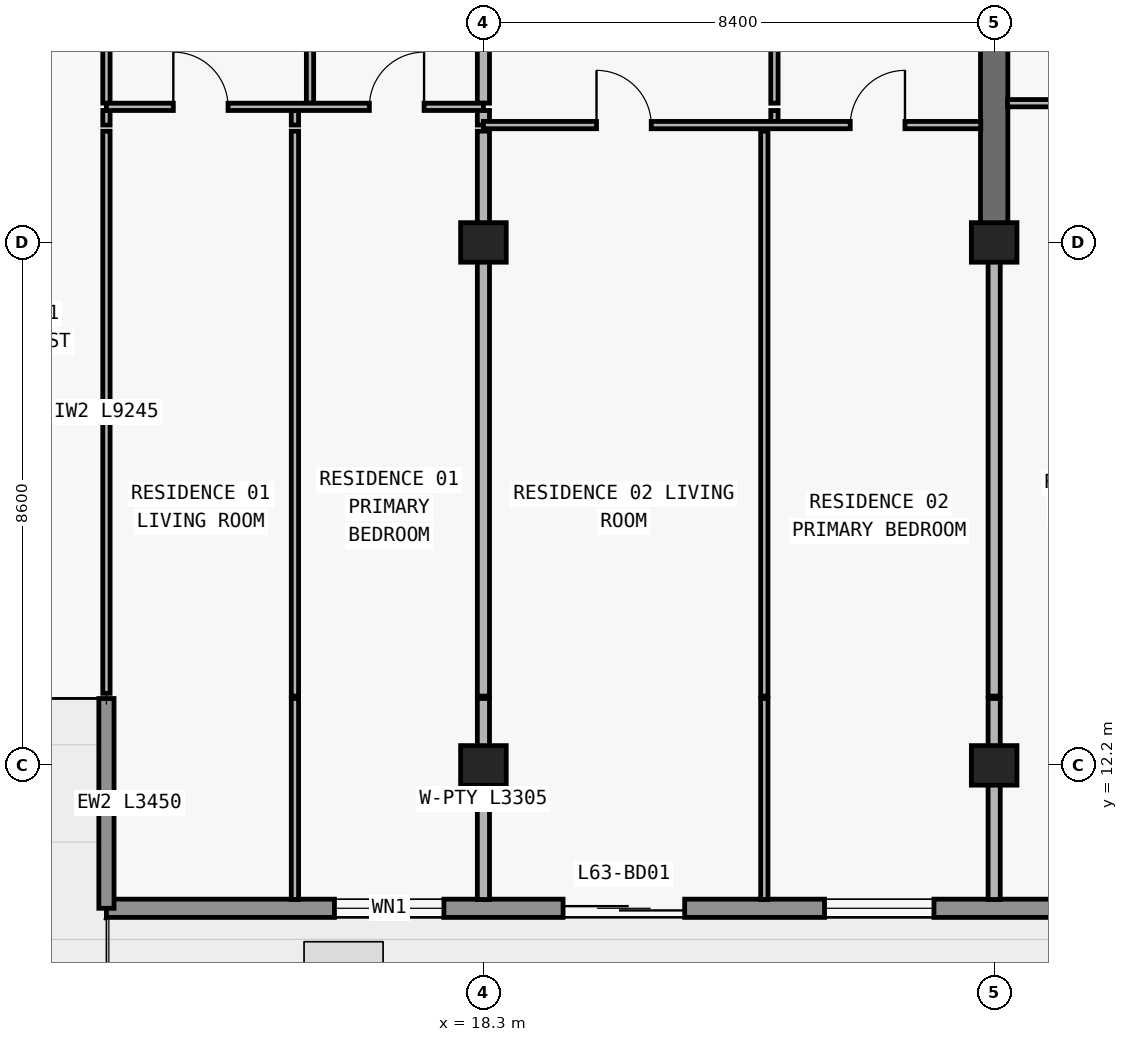
"""IFC4 building model, lengths in metres.
Left out: names, types, materials, properties, quantities, classifications, styles, units other than length and angle.
Written with IfcOpenShell. Run it as: python <this file> out.ifc"""

import sys

from ifc_helpers import new_model, si_unit, direction, frame, frame_2d, origin, origin_2d, place, context, subcontext, project, spatial, rectangle, extrude, element, fill, save


model = new_model("IFC4")
c1 = context("Model", 3, precision=1e-05, world=origin(), true_north=direction((0.0, 1.0)))
c2 = subcontext(c1, "Body", "Model", "MODEL_VIEW")
j1 = project(units=[si_unit("LENGTHUNIT", "METRE"), si_unit("PLANEANGLEUNIT", "RADIAN")], contexts=[c1])
p1 = place(None, origin())
s1 = spatial("IfcSite", under=j1, at=p1, CompositionType="ELEMENT")
p2 = place(p1, origin())
s2 = spatial("IfcBuilding", under=s1, at=p2, CompositionType="ELEMENT")
p3 = place(p2, frame((0.0, 0.0, 226.5)))
s3 = spatial("IfcBuildingStorey", under=s2, at=p3, CompositionType="ELEMENT", Elevation=226.5)
for number, where, z_axis, x_axis in (
    (1, (18.3, 12.2, 0.0), (0.0, 0.0, 1.0), (1.0, 0.0, 0.0)),
    (2, (26.7, 12.2, 0.0), (0.0, 0.0, 1.0), (1.0, 0.0, 0.0)),
    (3, (18.3, 20.8, 0.0), (0.0, 0.0, 1.0), (1.0, 0.0, 0.0)),
    (4, (26.7, 20.8, 0.0), (0.0, 0.0, 1.0), (1.0, 0.0, 0.0)),
):
    element("IfcColumn", number, at=place(p3, frame(where, z_axis=z_axis, x_axis=x_axis)), inside=s3, PredefinedType="COLUMN", context=c2, shape_type="SweptSolid", body=[
        extrude(rectangle(XDim=0.75, YDim=0.65, at=origin_2d()), origin(), (0.0, 0.0, 1.0), 3.05),
    ])
p4 = place(p3, frame((26.7, 20.8, 0.0), z_axis=(0.0, 0.0, 1.0), x_axis=(0.0, 1.0, 0.0)))
e5 = element("IfcWall", 5, at=p4, inside=s3, PredefinedType="SHEAR", context=c2, shape_type="SweptSolid", body=[
    extrude(rectangle(XDim=8.6, YDim=0.45, at=frame_2d((4.3, 0.0))), origin(), (0.0, 0.0, 1.0), 3.05),
])
p5 = place(p3, frame((65.7, 9.85, 0.0), z_axis=(0.0, 0.0, 1.0), x_axis=(-1.0, 0.0, 0.0)))
e6 = element("IfcWall", 6, at=p5, inside=s3, PredefinedType="STANDARD", context=c2, shape_type="SweptSolid", body=[
    extrude(rectangle(XDim=53.6, YDim=0.3, at=frame_2d((26.8, 0.0))), origin(), (0.0, 0.0, 1.0), 3.05),
])
p6 = place(p5, frame((48.05, 0.0, 0.85)))
e7 = element("IfcOpeningElement", 7, at=p6, cuts=e6, PredefinedType="OPENING", context=c2, shape_type="SweptSolid", body=[
    extrude(rectangle(XDim=1.8, YDim=1.55, at=frame_2d((0.9, 0.775))), frame((0.0, 0.16, 0.0), z_axis=(0.0, -1.0, 0.0), x_axis=(1.0, 0.0, 0.0)), (0.0, 0.0, 1.0), 0.32),
])
p7 = place(p5, frame((44.09, 0.0, 0.0)))
e8 = element("IfcOpeningElement", 8, at=p7, cuts=e6, PredefinedType="OPENING", context=c2, shape_type="SweptSolid", body=[
    extrude(rectangle(XDim=2.0, YDim=2.3, at=frame_2d((1.0, 1.15))), frame((0.0, 0.16, 0.0), z_axis=(0.0, -1.0, 0.0), x_axis=(1.0, 0.0, 0.0)), (0.0, 0.0, 1.0), 0.32),
])
p8 = place(p5, frame((39.99, 0.0, 0.85)))
e9 = element("IfcOpeningElement", 9, at=p8, cuts=e6, PredefinedType="OPENING", context=c2, shape_type="SweptSolid", body=[
    extrude(rectangle(XDim=1.8, YDim=1.55, at=frame_2d((0.9, 0.775))), frame((0.0, 0.16, 0.0), z_axis=(0.0, -1.0, 0.0), x_axis=(1.0, 0.0, 0.0)), (0.0, 0.0, 1.0), 0.32),
])
p9 = place(p5, frame((36.026, 0.0, 0.0)))
e10 = element("IfcOpeningElement", 10, at=p9, cuts=e6, PredefinedType="OPENING", context=c2, shape_type="SweptSolid", body=[
    extrude(rectangle(XDim=2.0, YDim=2.3, at=frame_2d((1.0, 1.15))), frame((0.0, 0.16, 0.0), z_axis=(0.0, -1.0, 0.0), x_axis=(1.0, 0.0, 0.0)), (0.0, 0.0, 1.0), 0.32),
])
p10 = place(p5, frame((31.726, 0.0, 0.85)))
e11 = element("IfcOpeningElement", 11, at=p10, cuts=e6, PredefinedType="OPENING", context=c2, shape_type="SweptSolid", body=[
    extrude(rectangle(XDim=2.2, YDim=1.55, at=frame_2d((1.1, 0.775))), frame((0.0, 0.16, 0.0), z_axis=(0.0, -1.0, 0.0), x_axis=(1.0, 0.0, 0.0)), (0.0, 0.0, 1.0), 0.32),
])
p11 = place(p5, frame((27.51, 0.0, 0.0)))
e12 = element("IfcOpeningElement", 12, at=p11, cuts=e6, PredefinedType="OPENING", context=c2, shape_type="SweptSolid", body=[
    extrude(rectangle(XDim=2.0, YDim=2.3, at=frame_2d((1.0, 1.15))), frame((0.0, 0.16, 0.0), z_axis=(0.0, -1.0, 0.0), x_axis=(1.0, 0.0, 0.0)), (0.0, 0.0, 1.0), 0.32),
])
p12 = place(p5, frame((23.81, 0.0, 0.85)))
e13 = element("IfcOpeningElement", 13, at=p12, cuts=e6, PredefinedType="OPENING", context=c2, shape_type="SweptSolid", body=[
    extrude(rectangle(XDim=1.8, YDim=1.55, at=frame_2d((0.9, 0.775))), frame((0.0, 0.16, 0.0), z_axis=(0.0, -1.0, 0.0), x_axis=(1.0, 0.0, 0.0)), (0.0, 0.0, 1.0), 0.32),
])
p13 = place(p5, frame((20.026, 0.0, 0.0)))
e14 = element("IfcOpeningElement", 14, at=p13, cuts=e6, PredefinedType="OPENING", context=c2, shape_type="SweptSolid", body=[
    extrude(rectangle(XDim=2.0, YDim=2.3, at=frame_2d((1.0, 1.15))), frame((0.0, 0.16, 0.0), z_axis=(0.0, -1.0, 0.0), x_axis=(1.0, 0.0, 0.0)), (0.0, 0.0, 1.0), 0.32),
])
p14 = place(p5, frame((15.726, 0.0, 0.85)))
e15 = element("IfcOpeningElement", 15, at=p14, cuts=e6, PredefinedType="OPENING", context=c2, shape_type="SweptSolid", body=[
    extrude(rectangle(XDim=2.2, YDim=1.55, at=frame_2d((1.1, 0.775))), frame((0.0, 0.16, 0.0), z_axis=(0.0, -1.0, 0.0), x_axis=(1.0, 0.0, 0.0)), (0.0, 0.0, 1.0), 0.32),
])
p15 = place(p5, frame((11.29, 0.0, 0.0)))
e16 = element("IfcOpeningElement", 16, at=p15, cuts=e6, PredefinedType="OPENING", context=c2, shape_type="SweptSolid", body=[
    extrude(rectangle(XDim=2.0, YDim=2.3, at=frame_2d((1.0, 1.15))), frame((0.0, 0.16, 0.0), z_axis=(0.0, -1.0, 0.0), x_axis=(1.0, 0.0, 0.0)), (0.0, 0.0, 1.0), 0.32),
])
p16 = place(p5, frame((7.19, 0.0, 0.85)))
e17 = element("IfcOpeningElement", 17, at=p16, cuts=e6, PredefinedType="OPENING", context=c2, shape_type="SweptSolid", body=[
    extrude(rectangle(XDim=1.8, YDim=1.55, at=frame_2d((0.9, 0.775))), frame((0.0, 0.16, 0.0), z_axis=(0.0, -1.0, 0.0), x_axis=(1.0, 0.0, 0.0)), (0.0, 0.0, 1.0), 0.32),
])
p17 = place(p5, frame((0.65, 0.0, 0.85)))
e18 = element("IfcOpeningElement", 18, at=p17, cuts=e6, PredefinedType="OPENING", context=c2, shape_type="SweptSolid", body=[
    extrude(rectangle(XDim=1.8, YDim=1.55, at=frame_2d((0.9, 0.775))), frame((0.0, 0.16, 0.0), z_axis=(0.0, -1.0, 0.0), x_axis=(1.0, 0.0, 0.0)), (0.0, 0.0, 1.0), 0.32),
])
p18 = place(p3, frame((12.1, 13.3, 0.0), z_axis=(0.0, 0.0, 1.0), x_axis=(0.0, -1.0, 0.0)))
e19 = element("IfcWall", 19, at=p18, inside=s3, PredefinedType="ELEMENTEDWALL", context=c2, shape_type="SweptSolid", body=[
    extrude(rectangle(XDim=3.45, YDim=0.25, at=frame_2d((1.725, 0.0))), origin(), (0.0, 0.0, 1.0), 3.05),
])
p19 = place(p3, frame((12.1, 13.385, 0.0), z_axis=(0.0, 0.0, 1.0), x_axis=(0.0, 1.0, 0.0)))
e20 = element("IfcWall", 20, at=p19, inside=s3, PredefinedType="PARTITIONING", context=c2, shape_type="SweptSolid", body=[
    extrude(rectangle(XDim=9.245, YDim=0.12, at=frame_2d((4.623, 0.0))), origin(), (0.0, 0.0, 1.0), 3.05),
])
p20 = place(p3, frame((12.1, 22.73, 0.0), z_axis=(0.0, 0.0, 1.0), x_axis=(0.0, 1.0, 0.0)))
e21 = element("IfcWall", 21, at=p20, inside=s3, PredefinedType="PARTITIONING", context=c2, shape_type="SweptSolid", body=[
    extrude(rectangle(XDim=0.24, YDim=0.12, at=frame_2d((0.12, 0.0))), origin(), (0.0, 0.0, 1.0), 3.05),
])
p21 = place(p3, frame((12.1, 23.09, 0.0), z_axis=(0.0, 0.0, 1.0), x_axis=(0.0, 1.0, 0.0)))
e22 = element("IfcWall", 22, at=p21, inside=s3, PredefinedType="PARTITIONING", context=c2, shape_type="SweptSolid", body=[
    extrude(rectangle(XDim=4.69, YDim=0.12, at=frame_2d((2.345, 0.0))), origin(), (0.0, 0.0, 1.0), 3.05),
])
p22 = place(p21, frame((1.895, 0.0, 0.0)))
e23 = element("IfcOpeningElement", 23, at=p22, cuts=e22, PredefinedType="OPENING", context=c2, shape_type="SweptSolid", body=[
    extrude(rectangle(XDim=0.9, YDim=2.15, at=frame_2d((0.45, 1.075))), frame((0.0, 0.07, 0.0), z_axis=(0.0, -1.0, 0.0), x_axis=(1.0, 0.0, 0.0)), (0.0, 0.0, 1.0), 0.14),
])
p23 = place(p3, frame((15.2, 9.995, 0.0), z_axis=(0.0, 0.0, 1.0), x_axis=(0.0, 1.0, 0.0)))
e24 = element("IfcWall", 24, at=p23, inside=s3, PredefinedType="PARTITIONING", context=c2, shape_type="SweptSolid", body=[
    extrude(rectangle(XDim=3.305, YDim=0.12, at=frame_2d((1.652, 0.0))), origin(), (0.0, 0.0, 1.0), 3.05),
])
p24 = place(p3, frame((15.2, 13.34, 0.0), z_axis=(0.0, 0.0, 1.0), x_axis=(0.0, 1.0, 0.0)))
e25 = element("IfcWall", 25, at=p24, inside=s3, PredefinedType="PARTITIONING", context=c2, shape_type="SweptSolid", body=[
    extrude(rectangle(XDim=9.29, YDim=0.12, at=frame_2d((4.645, 0.0))), origin(), (0.0, 0.0, 1.0), 3.05),
])
p25 = place(p3, frame((15.2, 22.73, 0.0), z_axis=(0.0, 0.0, 1.0), x_axis=(0.0, 1.0, 0.0)))
e26 = element("IfcWall", 26, at=p25, inside=s3, PredefinedType="PARTITIONING", context=c2, shape_type="SweptSolid", body=[
    extrude(rectangle(XDim=0.24, YDim=0.12, at=frame_2d((0.12, 0.0))), origin(), (0.0, 0.0, 1.0), 3.05),
])
p26 = place(p3, frame((15.448, 23.09, 0.0), z_axis=(0.0, 0.0, 1.0), x_axis=(0.0, 1.0, 0.0)))
e27 = element("IfcWall", 27, at=p26, inside=s3, PredefinedType="PARTITIONING", context=c2, shape_type="SweptSolid", body=[
    extrude(rectangle(XDim=4.69, YDim=0.12, at=frame_2d((2.345, 0.0))), origin(), (0.0, 0.0, 1.0), 3.05),
])
p27 = place(p26, frame((1.895, 0.0, 0.0)))
e28 = element("IfcOpeningElement", 28, at=p27, cuts=e27, PredefinedType="OPENING", context=c2, shape_type="SweptSolid", body=[
    extrude(rectangle(XDim=0.9, YDim=2.15, at=frame_2d((0.45, 1.075))), frame((0.0, 0.07, 0.0), z_axis=(0.0, -1.0, 0.0), x_axis=(1.0, 0.0, 0.0)), (0.0, 0.0, 1.0), 0.14),
])
p28 = place(p3, frame((18.3, 9.995, 0.0), z_axis=(0.0, 0.0, 1.0), x_axis=(0.0, 1.0, 0.0)))
e29 = element("IfcWall", 29, at=p28, inside=s3, PredefinedType="PARTITIONING", context=c2, shape_type="SweptSolid", body=[
    extrude(rectangle(XDim=3.305, YDim=0.2, at=frame_2d((1.652, 0.0))), origin(), (0.0, 0.0, 1.0), 2.263),
])
p29 = place(p3, frame((18.3, 13.34, 0.0), z_axis=(0.0, 0.0, 1.0), x_axis=(0.0, 1.0, 0.0)))
e30 = element("IfcWall", 30, at=p29, inside=s3, PredefinedType="PARTITIONING", context=c2, shape_type="SweptSolid", body=[
    extrude(rectangle(XDim=9.29, YDim=0.2, at=frame_2d((4.645, 0.0))), origin(), (0.0, 0.0, 1.0), 2.263),
])
p30 = place(p3, frame((18.3, 22.73, 0.0), z_axis=(0.0, 0.0, 1.0), x_axis=(0.0, 1.0, 0.0)))
e31 = element("IfcWall", 31, at=p30, inside=s3, PredefinedType="PARTITIONING", context=c2, shape_type="SweptSolid", body=[
    extrude(rectangle(XDim=0.24, YDim=0.2, at=frame_2d((0.12, 0.0))), origin(), (0.0, 0.0, 1.0), 2.263),
])
p31 = place(p3, frame((18.3, 23.09, 0.0), z_axis=(0.0, 0.0, 1.0), x_axis=(0.0, 1.0, 0.0)))
e32 = element("IfcWall", 32, at=p31, inside=s3, PredefinedType="PARTITIONING", context=c2, shape_type="SweptSolid", body=[
    extrude(rectangle(XDim=4.69, YDim=0.2, at=frame_2d((2.345, 0.0))), origin(), (0.0, 0.0, 1.0), 2.263),
])
p32 = place(p3, frame((22.92, 9.995, 0.0), z_axis=(0.0, 0.0, 1.0), x_axis=(0.0, 1.0, 0.0)))
e33 = element("IfcWall", 33, at=p32, inside=s3, PredefinedType="PARTITIONING", context=c2, shape_type="SweptSolid", body=[
    extrude(rectangle(XDim=3.305, YDim=0.12, at=frame_2d((1.652, 0.0))), origin(), (0.0, 0.0, 1.0), 3.05),
])
p33 = place(p3, frame((22.92, 13.34, 0.0), z_axis=(0.0, 0.0, 1.0), x_axis=(0.0, 1.0, 0.0)))
e34 = element("IfcWall", 34, at=p33, inside=s3, PredefinedType="PARTITIONING", context=c2, shape_type="SweptSolid", body=[
    extrude(rectangle(XDim=9.29, YDim=0.12, at=frame_2d((4.645, 0.0))), origin(), (0.0, 0.0, 1.0), 3.05),
])
p34 = place(p3, frame((23.086, 22.73, 0.0), z_axis=(0.0, 0.0, 1.0), x_axis=(0.0, 1.0, 0.0)))
e35 = element("IfcWall", 35, at=p34, inside=s3, PredefinedType="PARTITIONING", context=c2, shape_type="SweptSolid", body=[
    extrude(rectangle(XDim=0.24, YDim=0.12, at=frame_2d((0.12, 0.0))), origin(), (0.0, 0.0, 1.0), 3.05),
])
p35 = place(p3, frame((23.086, 23.09, 0.0), z_axis=(0.0, 0.0, 1.0), x_axis=(0.0, 1.0, 0.0)))
e36 = element("IfcWall", 36, at=p35, inside=s3, PredefinedType="PARTITIONING", context=c2, shape_type="SweptSolid", body=[
    extrude(rectangle(XDim=4.69, YDim=0.12, at=frame_2d((2.345, 0.0))), origin(), (0.0, 0.0, 1.0), 3.05),
])
p36 = place(p35, frame((1.895, 0.0, 0.0)))
e37 = element("IfcOpeningElement", 37, at=p36, cuts=e36, PredefinedType="OPENING", context=c2, shape_type="SweptSolid", body=[
    extrude(rectangle(XDim=0.9, YDim=2.15, at=frame_2d((0.45, 1.075))), frame((0.0, 0.07, 0.0), z_axis=(0.0, -1.0, 0.0), x_axis=(1.0, 0.0, 0.0)), (0.0, 0.0, 1.0), 0.14),
])
p37 = place(p3, frame((26.7, 9.995, 0.0), z_axis=(0.0, 0.0, 1.0), x_axis=(0.0, 1.0, 0.0)))
e38 = element("IfcWall", 38, at=p37, inside=s3, PredefinedType="PARTITIONING", context=c2, shape_type="SweptSolid", body=[
    extrude(rectangle(XDim=3.305, YDim=0.2, at=frame_2d((1.652, 0.0))), origin(), (0.0, 0.0, 1.0), 2.263),
])
p38 = place(p3, frame((26.7, 13.34, 0.0), z_axis=(0.0, 0.0, 1.0), x_axis=(0.0, 1.0, 0.0)))
e39 = element("IfcWall", 39, at=p38, inside=s3, PredefinedType="PARTITIONING", context=c2, shape_type="SweptSolid", body=[
    extrude(rectangle(XDim=7.455, YDim=0.2, at=frame_2d((3.728, 0.0))), origin(), (0.0, 0.0, 1.0), 2.263),
])
p39 = place(p3, frame((18.3, 22.73, 0.0), z_axis=(0.0, 0.0, 1.0), x_axis=(1.0, 0.0, 0.0)))
e40 = element("IfcWall", 40, at=p39, inside=s3, PredefinedType="PARTITIONING", context=c2, shape_type="SweptSolid", body=[
    extrude(rectangle(XDim=8.18, YDim=0.12, at=frame_2d((4.09, 0.0))), origin(), (0.0, 0.0, 1.0), 3.05),
])
p40 = place(p39, frame((1.86, 0.0, 0.0)))
e41 = element("IfcOpeningElement", 41, at=p40, cuts=e40, PredefinedType="OPENING", context=c2, shape_type="SweptSolid", body=[
    extrude(rectangle(XDim=0.9, YDim=2.15, at=frame_2d((0.45, 1.075))), frame((0.0, 0.07, 0.0), z_axis=(0.0, -1.0, 0.0), x_axis=(1.0, 0.0, 0.0)), (0.0, 0.0, 1.0), 0.14),
])
p41 = place(p39, frame((6.033, 0.0, 0.0)))
e42 = element("IfcOpeningElement", 42, at=p41, cuts=e40, PredefinedType="OPENING", context=c2, shape_type="SweptSolid", body=[
    extrude(rectangle(XDim=0.9, YDim=2.15, at=frame_2d((0.45, 1.075))), frame((0.0, 0.07, 0.0), z_axis=(0.0, -1.0, 0.0), x_axis=(1.0, 0.0, 0.0)), (0.0, 0.0, 1.0), 0.14),
])
p42 = place(p3, frame((12.1, 23.03, 0.0), z_axis=(0.0, 0.0, 1.0), x_axis=(1.0, 0.0, 0.0)))
e43 = element("IfcWall", 43, at=p42, inside=s3, PredefinedType="PARTITIONING", context=c2, shape_type="SweptSolid", body=[
    extrude(rectangle(XDim=6.2, YDim=0.12, at=frame_2d((3.1, 0.0))), origin(), (0.0, 0.0, 1.0), 3.05),
])
p43 = place(p42, frame((1.1, 0.0, 0.0)))
e44 = element("IfcOpeningElement", 44, at=p43, cuts=e43, PredefinedType="OPENING", context=c2, shape_type="SweptSolid", body=[
    extrude(rectangle(XDim=0.9, YDim=2.15, at=frame_2d((0.45, 1.075))), frame((0.0, 0.07, 0.0), z_axis=(0.0, -1.0, 0.0), x_axis=(1.0, 0.0, 0.0)), (0.0, 0.0, 1.0), 0.14),
])
p44 = place(p42, frame((4.324, 0.0, 0.0)))
e45 = element("IfcOpeningElement", 45, at=p44, cuts=e43, PredefinedType="OPENING", context=c2, shape_type="SweptSolid", body=[
    extrude(rectangle(XDim=0.9, YDim=2.15, at=frame_2d((0.45, 1.075))), frame((0.0, 0.07, 0.0), z_axis=(0.0, -1.0, 0.0), x_axis=(1.0, 0.0, 0.0)), (0.0, 0.0, 1.0), 0.14),
])
p45 = place(p3, frame((26.92, 23.09, 0.0), z_axis=(0.0, 0.0, 1.0), x_axis=(1.0, 0.0, 0.0)))
e46 = element("IfcWall", 46, at=p45, inside=s3, PredefinedType="PARTITIONING", context=c2, shape_type="SweptSolid", body=[
    extrude(rectangle(XDim=8.18, YDim=0.12, at=frame_2d((4.09, 0.0))), origin(), (0.0, 0.0, 1.0), 3.05),
])
p46 = place(p45, frame((1.414, 0.0, 0.0)))
e47 = element("IfcOpeningElement", 47, at=p46, cuts=e46, PredefinedType="OPENING", context=c2, shape_type="SweptSolid", body=[
    extrude(rectangle(XDim=0.9, YDim=2.15, at=frame_2d((0.45, 1.075))), frame((0.0, 0.07, 0.0), z_axis=(0.0, -1.0, 0.0), x_axis=(1.0, 0.0, 0.0)), (0.0, 0.0, 1.0), 0.14),
])
p47 = place(p45, frame((5.673, 0.0, 0.0)))
e48 = element("IfcOpeningElement", 48, at=p47, cuts=e46, PredefinedType="OPENING", context=c2, shape_type="SweptSolid", body=[
    extrude(rectangle(XDim=0.9, YDim=2.15, at=frame_2d((0.45, 1.075))), frame((0.0, 0.07, 0.0), z_axis=(0.0, -1.0, 0.0), x_axis=(1.0, 0.0, 0.0)), (0.0, 0.0, 1.0), 0.14),
])
p48 = place(p6, origin())
e49 = element("IfcWindow", 49, at=p48, inside=s3, PartitioningType="SINGLE_PANEL", PredefinedType="WINDOW", context=c2, shape_type="SweptSolid", body=[
    extrude(rectangle(XDim=1.8, YDim=1.55, at=frame_2d((0.9, 0.775))), frame((0.0, 0.03, 0.0), z_axis=(0.0, -1.0, 0.0), x_axis=(1.0, 0.0, 0.0)), (0.0, 0.0, 1.0), 0.06),
])
fill(e7, e49)
p49 = place(p7, origin())
e50 = element("IfcDoor", 50, at=p49, inside=s3, OperationType="DOUBLE_DOOR_SLIDING", PredefinedType="DOOR", context=c2, shape_type="SweptSolid", body=[
    extrude(rectangle(XDim=2.0, YDim=2.3, at=frame_2d((1.0, 1.15))), frame((0.0, 0.025, 0.0), z_axis=(0.0, -1.0, 0.0), x_axis=(1.0, 0.0, 0.0)), (0.0, 0.0, 1.0), 0.05),
])
fill(e8, e50)
p50 = place(p8, origin())
e51 = element("IfcWindow", 51, at=p50, inside=s3, PartitioningType="SINGLE_PANEL", PredefinedType="WINDOW", context=c2, shape_type="SweptSolid", body=[
    extrude(rectangle(XDim=1.8, YDim=1.55, at=frame_2d((0.9, 0.775))), frame((0.0, 0.03, 0.0), z_axis=(0.0, -1.0, 0.0), x_axis=(1.0, 0.0, 0.0)), (0.0, 0.0, 1.0), 0.06),
])
fill(e9, e51)
p51 = place(p43, origin())
e52 = element("IfcDoor", 52, at=p51, inside=s3, OperationType="SINGLE_SWING_LEFT", PredefinedType="DOOR", context=c2, shape_type="SweptSolid", body=[
    extrude(rectangle(XDim=0.9, YDim=2.15, at=frame_2d((0.45, 1.075))), frame((0.0, 0.025, 0.0), z_axis=(0.0, -1.0, 0.0), x_axis=(1.0, 0.0, 0.0)), (0.0, 0.0, 1.0), 0.05),
])
fill(e44, e52)
p52 = place(p44, origin())
e53 = element("IfcDoor", 53, at=p52, inside=s3, OperationType="SINGLE_SWING_RIGHT", PredefinedType="DOOR", context=c2, shape_type="SweptSolid", body=[
    extrude(rectangle(XDim=0.9, YDim=2.15, at=frame_2d((0.45, 1.075))), frame((0.0, 0.025, 0.0), z_axis=(0.0, -1.0, 0.0), x_axis=(1.0, 0.0, 0.0)), (0.0, 0.0, 1.0), 0.05),
])
fill(e45, e53)
p53 = place(p40, origin())
e54 = element("IfcDoor", 54, at=p53, inside=s3, OperationType="SINGLE_SWING_LEFT", PredefinedType="DOOR", context=c2, shape_type="SweptSolid", body=[
    extrude(rectangle(XDim=0.9, YDim=2.15, at=frame_2d((0.45, 1.075))), frame((0.0, 0.025, 0.0), z_axis=(0.0, -1.0, 0.0), x_axis=(1.0, 0.0, 0.0)), (0.0, 0.0, 1.0), 0.05),
])
fill(e41, e54)
p54 = place(p41, origin())
e55 = element("IfcDoor", 55, at=p54, inside=s3, OperationType="SINGLE_SWING_RIGHT", PredefinedType="DOOR", context=c2, shape_type="SweptSolid", body=[
    extrude(rectangle(XDim=0.9, YDim=2.15, at=frame_2d((0.45, 1.075))), frame((0.0, 0.025, 0.0), z_axis=(0.0, -1.0, 0.0), x_axis=(1.0, 0.0, 0.0)), (0.0, 0.0, 1.0), 0.05),
])
fill(e42, e55)
save(model, sys.argv[1])
